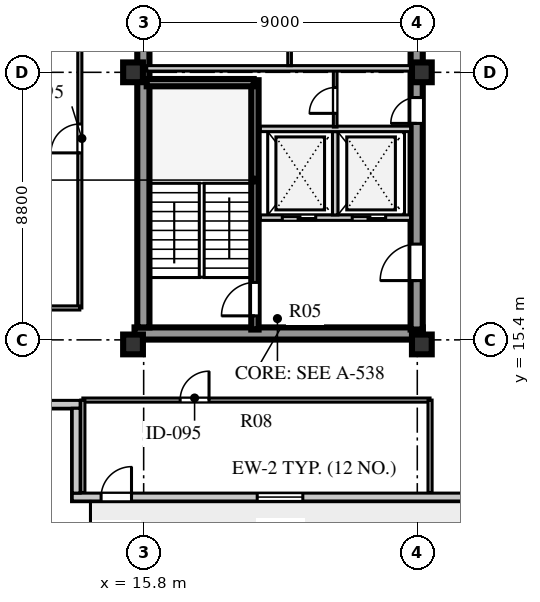
"""IFC4 building model, lengths in metres.
Left out: names, types, materials, properties, quantities, classifications, styles, units other than length and angle.
Written with IfcOpenShell. Run it as: python <this file> out.ifc"""

import sys

from ifc_helpers import new_model, si_unit, direction, frame, frame_2d, origin, origin_2d, place, context, subcontext, project, spatial, rectangle, extrude, element, fill, save


model = new_model("IFC4")
c1 = context("Model", 3, precision=1e-05, world=origin(), true_north=direction((0.0, 1.0)))
c2 = subcontext(c1, "Body", "Model", "MODEL_VIEW")
j1 = project(units=[si_unit("LENGTHUNIT", "METRE"), si_unit("PLANEANGLEUNIT", "RADIAN")], contexts=[c1])
p1 = place(None, origin())
s1 = spatial("IfcSite", under=j1, at=p1, CompositionType="ELEMENT")
p2 = place(p1, origin())
s2 = spatial("IfcBuilding", under=s1, at=p2, CompositionType="ELEMENT")
p3 = place(p2, frame((0.0, 0.0, 296.0)))
s3 = spatial("IfcBuildingStorey", under=s2, at=p3, CompositionType="ELEMENT", Elevation=296.0)
p4 = place(p3, frame((15.5, 15.61, 0.0), z_axis=(0.0, 0.0, 1.0), x_axis=(1.0, 0.0, 0.0)))
e1 = element("IfcWall", 1, at=p4, inside=s3, PredefinedType="SHEAR", context=c2, shape_type="SweptSolid", body=[
    extrude(rectangle(XDim=9.48, YDim=0.4, at=frame_2d((4.74, 0.0))), origin(), (0.0, 0.0, 1.0), 3.66),
])
p5 = place(p3, frame((15.79, 15.81, 0.0), z_axis=(0.0, 0.0, 1.0), x_axis=(0.0, 1.0, 0.0)))
e2 = element("IfcWall", 2, at=p5, inside=s3, PredefinedType="SHEAR", context=c2, shape_type="SweptSolid", body=[
    extrude(rectangle(XDim=25.63, YDim=0.4, at=frame_2d((12.815, 0.0))), origin(), (0.0, 0.0, 1.0), 3.66),
])
p6 = place(p3, frame((24.78, 15.74, 0.0), z_axis=(0.0, 0.0, 1.0), x_axis=(0.0, 1.0, 0.0)))
e3 = element("IfcWall", 3, at=p6, inside=s3, PredefinedType="SHEAR", context=c2, shape_type="SweptSolid", body=[
    extrude(rectangle(XDim=25.76, YDim=0.4, at=frame_2d((12.88, 0.0))), origin(), (0.0, 0.0, 1.0), 3.66),
])
p7 = place(p6, frame((1.61, 0.0, 0.0)))
e4 = element("IfcOpeningElement", 4, at=p7, cuts=e3, PredefinedType="OPENING", context=c2, shape_type="SweptSolid", body=[
    extrude(rectangle(XDim=1.2, YDim=2.1, at=frame_2d((0.6, 1.05))), frame((0.0, 0.21, 0.0), z_axis=(0.0, -1.0, 0.0), x_axis=(1.0, 0.0, 0.0)), (0.0, 0.0, 1.0), 0.42),
])
p8 = place(p6, frame((6.78, 0.0, 0.0)))
e5 = element("IfcOpeningElement", 5, at=p8, cuts=e3, PredefinedType="OPENING", context=c2, shape_type="SweptSolid", body=[
    extrude(rectangle(XDim=0.85, YDim=2.06, at=frame_2d((0.425, 1.03))), frame((0.0, 0.21, 0.0), z_axis=(0.0, -1.0, 0.0), x_axis=(1.0, 0.0, 0.0)), (0.0, 0.0, 1.0), 0.42),
])
p9 = place(p6, frame((12.11, 0.0, 0.0)))
e6 = element("IfcOpeningElement", 6, at=p9, cuts=e3, PredefinedType="OPENING", context=c2, shape_type="SweptSolid", body=[
    extrude(rectangle(XDim=1.5, YDim=2.12, at=frame_2d((0.75, 1.06))), frame((0.0, 0.21, 0.0), z_axis=(0.0, -1.0, 0.0), x_axis=(1.0, 0.0, 0.0)), (0.0, 0.0, 1.0), 0.42),
])
p10 = place(p6, frame((20.11, 0.0, 0.0)))
e7 = element("IfcOpeningElement", 7, at=p10, cuts=e3, PredefinedType="OPENING", context=c2, shape_type="SweptSolid", body=[
    extrude(rectangle(XDim=1.2, YDim=2.12, at=frame_2d((0.6, 1.06))), frame((0.0, 0.21, 0.0), z_axis=(0.0, -1.0, 0.0), x_axis=(1.0, 0.0, 0.0)), (0.0, 0.0, 1.0), 0.42),
])
p11 = place(p6, frame((24.01, 0.0, 0.0)))
e8 = element("IfcOpeningElement", 8, at=p11, cuts=e3, PredefinedType="OPENING", context=c2, shape_type="SweptSolid", body=[
    extrude(rectangle(XDim=0.95, YDim=2.1, at=frame_2d((0.475, 1.05))), frame((0.0, 0.21, 0.0), z_axis=(0.0, -1.0, 0.0), x_axis=(1.0, 0.0, 0.0)), (0.0, 0.0, 1.0), 0.42),
])
for number, where, z_axis, x_axis in (
    (9, (15.45, 15.25, 0.0), (0.0, 0.0, 1.0), (1.0, 0.0, 0.0)),
    (10, (15.45, 24.2, 0.0), (0.0, 0.0, 1.0), (1.0, 0.0, 0.0)),
    (11, (24.95, 15.25, 0.0), (0.0, 0.0, 1.0), (1.0, 0.0, 0.0)),
    (12, (24.95, 24.2, 0.0), (0.0, 0.0, 1.0), (1.0, 0.0, 0.0)),
):
    element("IfcColumn", number, at=place(p3, frame(where, z_axis=z_axis, x_axis=x_axis)), inside=s3, PredefinedType="COLUMN", context=c2, shape_type="SweptSolid", body=[
        extrude(rectangle(XDim=0.65, YDim=0.65, at=origin_2d()), origin(), (0.0, 0.0, 1.0), 3.66),
    ])
p12 = place(p3, frame((13.45, 10.23, 0.0), z_axis=(0.0, 0.0, 1.0), x_axis=(1.0, 0.0, 0.0)))
e13 = element("IfcWall", 13, at=p12, inside=s3, PredefinedType="SOLIDWALL", context=c2, shape_type="SweptSolid", body=[
    extrude(rectangle(XDim=31.7, YDim=0.26, at=frame_2d((15.85, 0.0))), origin(), (0.0, 0.0, 1.0), 3.66),
])
p13 = place(p12, frame((0.95, 0.0, 0.0)))
e14 = element("IfcOpeningElement", 14, at=p13, cuts=e13, PredefinedType="OPENING", context=c2, shape_type="SweptSolid", body=[
    extrude(rectangle(XDim=1.0, YDim=2.05, at=frame_2d((0.5, 1.025))), frame((0.0, 0.14, 0.0), z_axis=(0.0, -1.0, 0.0), x_axis=(1.0, 0.0, 0.0)), (0.0, 0.0, 1.0), 0.28),
])
p14 = place(p12, frame((6.085, 0.0, 0.8)))
e15 = element("IfcOpeningElement", 15, at=p14, cuts=e13, PredefinedType="OPENING", context=c2, shape_type="SweptSolid", body=[
    extrude(rectangle(XDim=1.5, YDim=2.0, at=frame_2d((0.75, 1.0))), frame((0.0, 0.14, 0.0), z_axis=(0.0, -1.0, 0.0), x_axis=(1.0, 0.0, 0.0)), (0.0, 0.0, 1.0), 0.28),
])
p15 = place(p12, frame((15.223, 0.0, 0.8)))
e16 = element("IfcOpeningElement", 16, at=p15, cuts=e13, PredefinedType="OPENING", context=c2, shape_type="SweptSolid", body=[
    extrude(rectangle(XDim=1.2, YDim=1.75, at=frame_2d((0.6, 0.875))), frame((0.0, 0.14, 0.0), z_axis=(0.0, -1.0, 0.0), x_axis=(1.0, 0.0, 0.0)), (0.0, 0.0, 1.0), 0.28),
])
p16 = place(p12, frame((20.658, 0.0, 0.8)))
e17 = element("IfcOpeningElement", 17, at=p16, cuts=e13, PredefinedType="OPENING", context=c2, shape_type="SweptSolid", body=[
    extrude(rectangle(XDim=2.4, YDim=2.05, at=frame_2d((1.2, 1.025))), frame((0.0, 0.14, 0.0), z_axis=(0.0, -1.0, 0.0), x_axis=(1.0, 0.0, 0.0)), (0.0, 0.0, 1.0), 0.28),
])
p17 = place(p12, frame((27.595, 0.0, 0.8)))
e18 = element("IfcOpeningElement", 18, at=p17, cuts=e13, PredefinedType="OPENING", context=c2, shape_type="SweptSolid", body=[
    extrude(rectangle(XDim=2.1, YDim=1.95, at=frame_2d((1.05, 0.975))), frame((0.0, 0.14, 0.0), z_axis=(0.0, -1.0, 0.0), x_axis=(1.0, 0.0, 0.0)), (0.0, 0.0, 1.0), 0.28),
])
p18 = place(p3, frame((10.4, 13.28, 0.0), z_axis=(0.0, 0.0, 1.0), x_axis=(1.0, 0.0, 0.0)))
e19 = element("IfcWall", 19, at=p18, inside=s3, PredefinedType="SOLIDWALL", context=c2, shape_type="SweptSolid", body=[
    extrude(rectangle(XDim=3.31, YDim=0.26, at=frame_2d((1.655, 0.0))), origin(), (0.0, 0.0, 1.0), 3.66),
])
p19 = place(p3, frame((13.58, 13.15, 0.0), z_axis=(0.0, 0.0, 1.0), x_axis=(0.0, -1.0, 0.0)))
e20 = element("IfcWall", 20, at=p19, inside=s3, PredefinedType="SOLIDWALL", context=c2, shape_type="SweptSolid", body=[
    extrude(rectangle(XDim=2.79, YDim=0.26, at=frame_2d((1.395, 0.0))), origin(), (0.0, 0.0, 1.0), 3.66),
])
p20 = place(p3, frame((19.46, 15.74, 0.0), z_axis=(0.0, 0.0, 1.0), x_axis=(0.0, 1.0, 0.0)))
e21 = element("IfcWall", 21, at=p20, inside=s3, PredefinedType="SHEAR", context=c2, shape_type="SweptSolid", body=[
    extrude(rectangle(XDim=8.2, YDim=0.24, at=frame_2d((4.1, 0.0))), origin(), (0.0, 0.0, 1.0), 3.9),
])
p21 = place(p20, frame((0.45, 0.0, 0.0)))
e22 = element("IfcOpeningElement", 22, at=p21, cuts=e21, PredefinedType="OPENING", context=c2, shape_type="SweptSolid", body=[
    extrude(rectangle(XDim=1.1, YDim=2.1, at=frame_2d((0.55, 1.05))), frame((0.0, 0.13, 0.0), z_axis=(0.0, -1.0, 0.0), x_axis=(1.0, 0.0, 0.0)), (0.0, 0.0, 1.0), 0.26),
])
p22 = place(p3, frame((15.9, 23.86, 0.0), z_axis=(0.0, 0.0, 1.0), x_axis=(1.0, 0.0, 0.0)))
e23 = element("IfcWall", 23, at=p22, inside=s3, PredefinedType="SHEAR", context=c2, shape_type="SweptSolid", body=[
    extrude(rectangle(XDim=3.52, YDim=0.24, at=frame_2d((1.76, 0.0))), origin(), (0.0, 0.0, 1.0), 3.9),
])
p23 = place(p3, frame((19.64, 19.42, 0.0), z_axis=(0.0, 0.0, 1.0), x_axis=(1.0, 0.0, 0.0)))
e24 = element("IfcWall", 24, at=p23, inside=s3, PredefinedType="SOLIDWALL", context=c2, shape_type="SweptSolid", body=[
    extrude(rectangle(XDim=4.94, YDim=0.18, at=frame_2d((2.47, 0.0))), origin(), (0.0, 0.0, 1.0), 3.66),
])
p24 = place(p23, frame((0.72, 0.0, 0.0)))
e25 = element("IfcOpeningElement", 25, at=p24, cuts=e24, PredefinedType="OPENING", context=c2, shape_type="SweptSolid", body=[
    extrude(rectangle(XDim=1.1, YDim=2.1, at=frame_2d((0.55, 1.05))), frame((0.0, 0.1, 0.0), z_axis=(0.0, -1.0, 0.0), x_axis=(1.0, 0.0, 0.0)), (0.0, 0.0, 1.0), 0.2),
])
p25 = place(p23, frame((3.02, 0.0, 0.0)))
e26 = element("IfcOpeningElement", 26, at=p25, cuts=e24, PredefinedType="OPENING", context=c2, shape_type="SweptSolid", body=[
    extrude(rectangle(XDim=1.1, YDim=2.1, at=frame_2d((0.55, 1.05))), frame((0.0, 0.1, 0.0), z_axis=(0.0, -1.0, 0.0), x_axis=(1.0, 0.0, 0.0)), (0.0, 0.0, 1.0), 0.2),
])
p26 = place(p3, frame((22.1, 19.51, 0.0), z_axis=(0.0, 0.0, 1.0), x_axis=(0.0, 1.0, 0.0)))
e27 = element("IfcWall", 27, at=p26, inside=s3, PredefinedType="SOLIDWALL", context=c2, shape_type="SweptSolid", body=[
    extrude(rectangle(XDim=2.74, YDim=0.18, at=frame_2d((1.37, 0.0))), origin(), (0.0, 0.0, 1.0), 3.66),
])
p27 = place(p3, frame((19.64, 22.34, 0.0), z_axis=(0.0, 0.0, 1.0), x_axis=(1.0, 0.0, 0.0)))
e28 = element("IfcWall", 28, at=p27, inside=s3, PredefinedType="SOLIDWALL", context=c2, shape_type="SweptSolid", body=[
    extrude(rectangle(XDim=4.94, YDim=0.18, at=frame_2d((2.47, 0.0))), origin(), (0.0, 0.0, 1.0), 3.66),
])
p28 = place(p3, frame((22.1, 22.4, 0.0), z_axis=(0.0, 0.0, 1.0), x_axis=(0.0, 1.0, 0.0)))
e29 = element("IfcWall", 29, at=p28, inside=s3, PredefinedType="PARTITIONING", context=c2, shape_type="SweptSolid", body=[
    extrude(rectangle(XDim=1.88, YDim=0.12, at=frame_2d((0.94, 0.0))), origin(), (0.0, 0.0, 1.0), 3.66),
])
p29 = place(p28, frame((0.45, 0.0, 0.0)))
e30 = element("IfcOpeningElement", 30, at=p29, cuts=e29, PredefinedType="OPENING", context=c2, shape_type="SweptSolid", body=[
    extrude(rectangle(XDim=0.85, YDim=2.06, at=frame_2d((0.425, 1.03))), frame((0.0, 0.07, 0.0), z_axis=(0.0, -1.0, 0.0), x_axis=(1.0, 0.0, 0.0)), (0.0, 0.0, 1.0), 0.14),
])
p30 = place(p3, frame((15.9, 24.33, 0.0), z_axis=(0.0, 0.0, 1.0), x_axis=(1.0, 0.0, 0.0)))
e31 = element("IfcWall", 31, at=p30, inside=s3, PredefinedType="SOLIDWALL", context=c2, shape_type="SweptSolid", body=[
    extrude(rectangle(XDim=8.68, YDim=0.18, at=frame_2d((4.34, 0.0))), origin(), (0.0, 0.0, 1.0), 3.06),
])
p31 = place(p3, frame((20.6, 24.42, 0.0), z_axis=(0.0, 0.0, 1.0), x_axis=(0.0, 1.0, 0.0)))
e32 = element("IfcWall", 32, at=p31, inside=s3, PredefinedType="PARTITIONING", context=c2, shape_type="SweptSolid", body=[
    extrude(rectangle(XDim=2.02, YDim=0.12, at=frame_2d((1.01, 0.0))), origin(), (0.0, 0.0, 1.0), 3.66),
])
p32 = place(p3, frame((13.8, 13.42, 0.0), z_axis=(0.0, 0.0, 1.0), x_axis=(1.0, 0.0, 0.0)))
e33 = element("IfcWall", 33, at=p32, inside=s3, PredefinedType="PARTITIONING", context=c2, shape_type="SweptSolid", body=[
    extrude(rectangle(XDim=11.42, YDim=0.135, at=frame_2d((5.71, 0.0))), origin(), (0.0, 0.0, 1.0), 3.66),
])
p33 = place(p32, frame((3.2, 0.0, 0.0)))
e34 = element("IfcOpeningElement", 34, at=p33, cuts=e33, PredefinedType="OPENING", context=c2, shape_type="SweptSolid", body=[
    extrude(rectangle(XDim=0.95, YDim=2.08, at=frame_2d((0.475, 1.04))), frame((0.0, 0.078, 0.0), z_axis=(0.0, -1.0, 0.0), x_axis=(1.0, 0.0, 0.0)), (0.0, 0.0, 1.0), 0.155),
])
p34 = place(p3, frame((13.8, 10.38, 0.0), z_axis=(0.0, 0.0, 1.0), x_axis=(0.0, 1.0, 0.0)))
e35 = element("IfcWall", 35, at=p34, inside=s3, PredefinedType="PARTITIONING", context=c2, shape_type="SweptSolid", body=[
    extrude(rectangle(XDim=3.04, YDim=0.135, at=frame_2d((1.52, 0.0))), origin(), (0.0, 0.0, 1.0), 3.66),
])
p35 = place(p3, frame((25.22, 10.38, 0.0), z_axis=(0.0, 0.0, 1.0), x_axis=(0.0, 1.0, 0.0)))
e36 = element("IfcWall", 36, at=p35, inside=s3, PredefinedType="PARTITIONING", context=c2, shape_type="SweptSolid", body=[
    extrude(rectangle(XDim=3.04, YDim=0.135, at=frame_2d((1.52, 0.0))), origin(), (0.0, 0.0, 1.0), 3.21),
])
p36 = place(p3, frame((13.7, 16.45, 0.0), z_axis=(0.0, 0.0, 1.0), x_axis=(0.0, 1.0, 0.0)))
e37 = element("IfcWall", 37, at=p36, inside=s3, PredefinedType="PARTITIONING", context=c2, shape_type="SweptSolid", body=[
    extrude(rectangle(XDim=24.3, YDim=0.135, at=frame_2d((12.15, 0.0))), origin(), (0.0, 0.0, 1.0), 3.66),
])
p37 = place(p36, frame((5.1, 0.0, 0.0)))
e38 = element("IfcOpeningElement", 38, at=p37, cuts=e37, PredefinedType="OPENING", context=c2, shape_type="SweptSolid", body=[
    extrude(rectangle(XDim=0.95, YDim=2.08, at=frame_2d((0.475, 1.04))), frame((0.0, 0.078, 0.0), z_axis=(0.0, -1.0, 0.0), x_axis=(1.0, 0.0, 0.0)), (0.0, 0.0, 1.0), 0.155),
])
p38 = place(p3, frame((10.68, 16.45, 0.0), z_axis=(0.0, 0.0, 1.0), x_axis=(1.0, 0.0, 0.0)))
e39 = element("IfcWall", 39, at=p38, inside=s3, PredefinedType="PARTITIONING", context=c2, shape_type="SweptSolid", body=[
    extrude(rectangle(XDim=3.02, YDim=0.135, at=frame_2d((1.51, 0.0))), origin(), (0.0, 0.0, 1.0), 3.66),
])
p39 = place(p13, frame((1.0, 0.0, 0.0), z_axis=(0.0, 0.0, 1.0), x_axis=(-1.0, 0.0, 0.0)))
e40 = element("IfcDoor", 40, at=p39, inside=s3, OperationType="SINGLE_SWING_LEFT", PredefinedType="DOOR", context=c2, shape_type="SweptSolid", body=[
    extrude(rectangle(XDim=1.0, YDim=2.05, at=frame_2d((0.5, 1.025))), frame((0.0, 0.025, 0.0), z_axis=(0.0, -1.0, 0.0), x_axis=(1.0, 0.0, 0.0)), (0.0, 0.0, 1.0), 0.05),
])
fill(e14, e40)
p40 = place(p14, origin())
e41 = element("IfcWindow", 41, at=p40, inside=s3, PartitioningType="SINGLE_PANEL", PredefinedType="WINDOW", context=c2, shape_type="SweptSolid", body=[
    extrude(rectangle(XDim=1.5, YDim=2.0, at=frame_2d((0.75, 1.0))), frame((0.0, 0.03, 0.0), z_axis=(0.0, -1.0, 0.0), x_axis=(1.0, 0.0, 0.0)), (0.0, 0.0, 1.0), 0.06),
])
fill(e15, e41)
p41 = place(p21, origin())
e42 = element("IfcDoor", 42, at=p41, inside=s3, OperationType="SINGLE_SWING_LEFT", PredefinedType="DOOR", context=c2, shape_type="SweptSolid", body=[
    extrude(rectangle(XDim=1.1, YDim=2.1, at=frame_2d((0.55, 1.05))), frame((0.0, 0.025, 0.0), z_axis=(0.0, -1.0, 0.0), x_axis=(1.0, 0.0, 0.0)), (0.0, 0.0, 1.0), 0.05),
])
fill(e22, e42)
p42 = place(p24, origin())
e43 = element("IfcDoor", 43, at=p42, inside=s3, OperationType="DOUBLE_DOOR_SLIDING", PredefinedType="DOOR", context=c2, shape_type="SweptSolid", body=[
    extrude(rectangle(XDim=1.1, YDim=2.1, at=frame_2d((0.55, 1.05))), frame((0.0, 0.025, 0.0), z_axis=(0.0, -1.0, 0.0), x_axis=(1.0, 0.0, 0.0)), (0.0, 0.0, 1.0), 0.05),
])
fill(e25, e43)
p43 = place(p25, origin())
e44 = element("IfcDoor", 44, at=p43, inside=s3, OperationType="DOUBLE_DOOR_SLIDING", PredefinedType="DOOR", context=c2, shape_type="SweptSolid", body=[
    extrude(rectangle(XDim=1.1, YDim=2.1, at=frame_2d((0.55, 1.05))), frame((0.0, 0.025, 0.0), z_axis=(0.0, -1.0, 0.0), x_axis=(1.0, 0.0, 0.0)), (0.0, 0.0, 1.0), 0.05),
])
fill(e26, e44)
p44 = place(p7, frame((1.2, 0.0, 0.0), z_axis=(0.0, 0.0, 1.0), x_axis=(-1.0, 0.0, 0.0)))
e45 = element("IfcDoor", 45, at=p44, inside=s3, OperationType="SINGLE_SWING_RIGHT", PredefinedType="DOOR", context=c2, shape_type="SweptSolid", body=[
    extrude(rectangle(XDim=1.2, YDim=2.1, at=frame_2d((0.6, 1.05))), frame((0.0, 0.025, 0.0), z_axis=(0.0, -1.0, 0.0), x_axis=(1.0, 0.0, 0.0)), (0.0, 0.0, 1.0), 0.05),
])
fill(e4, e45)
p45 = place(p29, origin())
e46 = element("IfcDoor", 46, at=p45, inside=s3, OperationType="SINGLE_SWING_LEFT", PredefinedType="DOOR", context=c2, shape_type="SweptSolid", body=[
    extrude(rectangle(XDim=0.85, YDim=2.06, at=frame_2d((0.425, 1.03))), frame((0.0, 0.025, 0.0), z_axis=(0.0, -1.0, 0.0), x_axis=(1.0, 0.0, 0.0)), (0.0, 0.0, 1.0), 0.05),
])
fill(e30, e46)
p46 = place(p8, frame((0.85, 0.0, 0.0), z_axis=(0.0, 0.0, 1.0), x_axis=(-1.0, 0.0, 0.0)))
e47 = element("IfcDoor", 47, at=p46, inside=s3, OperationType="SINGLE_SWING_RIGHT", PredefinedType="DOOR", context=c2, shape_type="SweptSolid", body=[
    extrude(rectangle(XDim=0.85, YDim=2.06, at=frame_2d((0.425, 1.03))), frame((0.0, 0.025, 0.0), z_axis=(0.0, -1.0, 0.0), x_axis=(1.0, 0.0, 0.0)), (0.0, 0.0, 1.0), 0.05),
])
fill(e5, e47)
p47 = place(p33, frame((0.95, 0.0, 0.0), z_axis=(0.0, 0.0, 1.0), x_axis=(-1.0, 0.0, 0.0)))
e48 = element("IfcDoor", 48, at=p47, inside=s3, OperationType="SINGLE_SWING_LEFT", PredefinedType="DOOR", context=c2, shape_type="SweptSolid", body=[
    extrude(rectangle(XDim=0.95, YDim=2.08, at=frame_2d((0.475, 1.04))), frame((0.0, 0.025, 0.0), z_axis=(0.0, -1.0, 0.0), x_axis=(1.0, 0.0, 0.0)), (0.0, 0.0, 1.0), 0.05),
])
fill(e34, e48)
p48 = place(p37, origin())
e49 = element("IfcDoor", 49, at=p48, inside=s3, OperationType="SINGLE_SWING_LEFT", PredefinedType="DOOR", context=c2, shape_type="SweptSolid", body=[
    extrude(rectangle(XDim=0.95, YDim=2.08, at=frame_2d((0.475, 1.04))), frame((0.0, 0.025, 0.0), z_axis=(0.0, -1.0, 0.0), x_axis=(1.0, 0.0, 0.0)), (0.0, 0.0, 1.0), 0.05),
])
fill(e38, e49)
save(model, sys.argv[1])
